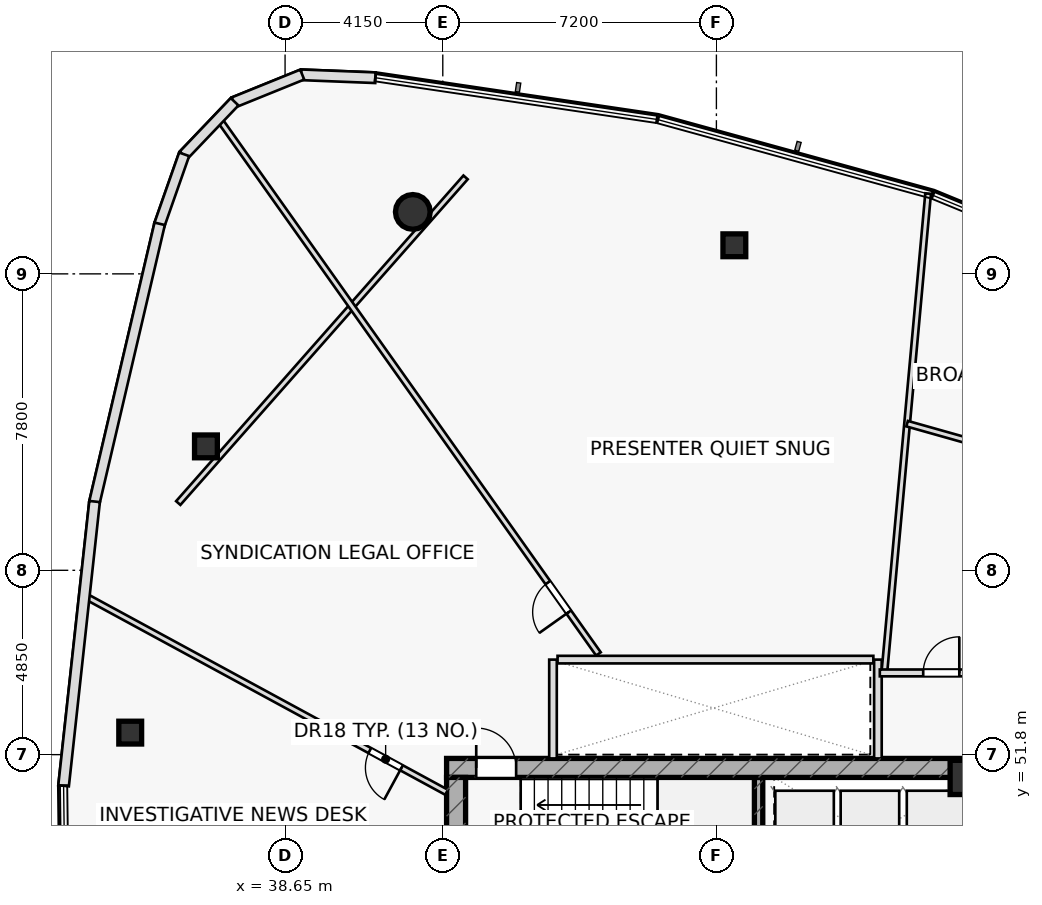
"""IFC4 building model, lengths in metres.
Left out: names, types, materials, properties, quantities, classifications, styles, units other than length and angle.
Written with IfcOpenShell. Run it as: python <this file> out.ifc"""

import sys

from ifc_helpers import new_model, si_unit, direction, frame, frame_2d, origin, origin_2d, place, context, subcontext, project, spatial, rectangle, hollow_rectangle, hollow_circle, extrude, element, fill, save


model = new_model("IFC4")
c1 = context("Model", 3, precision=1e-05, world=origin(), true_north=direction((0.0, 1.0)))
c2 = subcontext(c1, "Body", "Model", "MODEL_VIEW")
j1 = project(units=[si_unit("LENGTHUNIT", "METRE"), si_unit("PLANEANGLEUNIT", "RADIAN")], contexts=[c1])
p1 = place(None, origin())
s1 = spatial("IfcSite", under=j1, at=p1, CompositionType="ELEMENT")
p2 = place(p1, origin())
s2 = spatial("IfcBuilding", under=s1, at=p2, CompositionType="ELEMENT")
p3 = place(p2, frame((0.0, 0.0, 177.2)))
s3 = spatial("IfcBuildingStorey", under=s2, at=p3, CompositionType="ELEMENT", Elevation=177.2)
p4 = place(p3, frame((51.11, 48.1, 0.0), z_axis=(0.0, 0.0, 1.0), x_axis=(0.0, 1.0, 0.0)))
e1 = element("IfcWall", 1, at=p4, inside=s3, PredefinedType="SHEAR", context=c2, shape_type="SweptSolid", body=[
    extrude(rectangle(XDim=3.1, YDim=0.22, at=frame_2d((1.55, 0.0))), origin(), (0.0, 0.0, 1.0), 3.55),
])
p5 = place(p3, frame((42.9, 51.45, 0.0), z_axis=(0.0, 0.0, 1.0), x_axis=(1.0, 0.0, 0.0)))
e2 = element("IfcWall", 2, at=p5, inside=s3, PredefinedType="SHEAR", context=c2, shape_type="SweptSolid", body=[
    extrude(rectangle(XDim=14.2, YDim=0.5, at=frame_2d((7.1, 0.0))), origin(), (0.0, 0.0, 1.0), 3.55),
])
p6 = place(p5, frame((0.78, 0.0, 0.0)))
e3 = element("IfcOpeningElement", 3, at=p6, cuts=e2, PredefinedType="OPENING", context=c2, shape_type="SweptSolid", body=[
    extrude(rectangle(XDim=1.05, YDim=2.2, at=frame_2d((0.525, 1.1))), frame((0.0, 0.26, 0.0), z_axis=(0.0, -1.0, 0.0), x_axis=(1.0, 0.0, 0.0)), (0.0, 0.0, 1.0), 0.52),
])
p7 = place(p3, frame((43.15, 38.8, 0.0), z_axis=(0.0, 0.0, 1.0), x_axis=(0.0, 1.0, 0.0)))
e4 = element("IfcWall", 4, at=p7, inside=s3, PredefinedType="SHEAR", context=c2, shape_type="SweptSolid", body=[
    extrude(rectangle(XDim=12.4, YDim=0.5, at=frame_2d((6.2, 0.0))), origin(), (0.0, 0.0, 1.0), 3.55),
])
p8 = place(p3, frame((56.6, 51.2, 0.0), z_axis=(0.0, 0.0, 1.0), x_axis=(1.0, 0.0, 0.0)))
e5 = element("IfcColumn", 5, at=p8, inside=s3, PredefinedType="COLUMN", context=c2, shape_type="SweptSolid", body=[
    extrude(rectangle(XDim=0.9, YDim=0.9, at=origin_2d()), origin(), (0.0, 0.0, 1.0), 3.55),
])
p9 = place(p3, frame((42.011, 66.08, 0.0), z_axis=(0.0, 0.0, 1.0), x_axis=(1.0, 0.0, 0.0)))
e6 = element("IfcColumn", 6, at=p9, inside=s3, PredefinedType="COLUMN", context=c2, shape_type="SweptSolid", body=[
    extrude(hollow_circle(Radius=0.457, WallThickness=0.04, at=origin_2d()), origin(), (0.0, 0.0, 1.0), 3.55),
])
for number, where, z_axis, x_axis in (
    (7, (36.568, 59.911, 0.0), (0.0, 0.0, 1.0), (1.0, 0.0, 0.0)),
    (8, (34.575, 52.379, 0.0), (0.0, 0.0, 1.0), (1.0, 0.0, 0.0)),
    (9, (50.472, 65.202, 0.0), (0.0, 0.0, 1.0), (1.0, 0.0, 0.0)),
):
    element("IfcColumn", number, at=place(p3, frame(where, z_axis=z_axis, x_axis=x_axis)), inside=s3, PredefinedType="COLUMN", context=c2, shape_type="SweptSolid", body=[
        extrude(hollow_rectangle(XDim=0.6, YDim=0.6, WallThickness=0.036, at=origin_2d()), origin(), (0.0, 0.0, 1.0), 3.55),
    ])
for number, where, z_axis, x_axis in (
    (10, (45.7, 51.7, 0.0), (0.0, 0.0, 1.0), (0.0, 1.0, 0.0)),
    (11, (54.25, 51.7, 0.0), (0.0, 0.0, 1.0), (0.0, 1.0, 0.0)),
):
    element("IfcWall", number, at=place(p3, frame(where, z_axis=z_axis, x_axis=x_axis)), inside=s3, PredefinedType="PARTITIONING", context=c2, shape_type="SweptSolid", body=[
        extrude(rectangle(XDim=2.6, YDim=0.2, at=frame_2d((1.3, 0.0))), origin(), (0.0, 0.0, 1.0), 3.55),
    ])
p10 = place(p3, frame((43.4, 66.989, 0.0), z_axis=(0.0, 0.0, 1.0), x_axis=(-0.661622343701, -0.749837231881, 0.0)))
e12 = element("IfcWall", 12, at=p10, inside=s3, PredefinedType="PARTITIONING", context=c2, shape_type="SweptSolid", body=[
    extrude(rectangle(XDim=11.427, YDim=0.15, at=frame_2d((5.714, 0.0))), origin(), (0.0, 0.0, 1.0), 2.935),
])
p11 = place(p3, frame((42.9, 50.81, 0.0), z_axis=(0.0, 0.0, 1.0), x_axis=(-0.878810866854, 0.477170263427, 0.0)))
e13 = element("IfcWall", 13, at=p11, inside=s3, PredefinedType="PARTITIONING", context=c2, shape_type="SweptSolid", body=[
    extrude(rectangle(XDim=10.858, YDim=0.15, at=frame_2d((5.429, 0.0))), origin(), (0.0, 0.0, 1.0), 2.935),
])
p12 = place(p11, frame((1.35, 0.0, 0.0)))
e14 = element("IfcOpeningElement", 14, at=p12, cuts=e13, PredefinedType="OPENING", context=c2, shape_type="SweptSolid", body=[
    extrude(rectangle(XDim=0.95, YDim=2.05, at=frame_2d((0.475, 1.025))), frame((0.0, 0.085, 0.0), z_axis=(0.0, -1.0, 0.0), x_axis=(1.0, 0.0, 0.0)), (0.0, 0.0, 1.0), 0.17),
])
p13 = place(p3, frame((54.418, 53.95, 0.0), z_axis=(0.0, 0.0, 1.0), x_axis=(0.091038002484, 0.995847419088, 0.0)))
e15 = element("IfcWall", 15, at=p13, inside=s3, PredefinedType="PARTITIONING", context=c2, shape_type="SweptSolid", body=[
    extrude(rectangle(XDim=12.666, YDim=0.15, at=frame_2d((6.333, 0.0))), origin(), (0.0, 0.0, 1.0), 2.935),
])
p14 = place(p3, frame((46.896, 54.45, 0.0), z_axis=(0.0, 0.0, 1.0), x_axis=(-0.578628204747, 0.81559144225, 0.0)))
e16 = element("IfcWall", 16, at=p14, inside=s3, PredefinedType="PARTITIONING", context=c2, shape_type="SweptSolid", body=[
    extrude(rectangle(XDim=17.283, YDim=0.15, at=frame_2d((8.642, 0.0))), origin(), (0.0, 0.0, 1.0), 2.935),
])
p15 = place(p14, frame((1.35, 0.0, 0.0)))
e17 = element("IfcOpeningElement", 17, at=p15, cuts=e16, PredefinedType="OPENING", context=c2, shape_type="SweptSolid", body=[
    extrude(rectangle(XDim=0.95, YDim=2.05, at=frame_2d((0.475, 1.025))), frame((0.0, 0.085, 0.0), z_axis=(0.0, -1.0, 0.0), x_axis=(1.0, 0.0, 0.0)), (0.0, 0.0, 1.0), 0.17),
])
p16 = place(p3, frame((59.436, 59.263, 0.0), z_axis=(0.0, 0.0, 1.0), x_axis=(-0.962485295009, 0.27133384767, 0.0)))
e18 = element("IfcWall", 18, at=p16, inside=s3, PredefinedType="PARTITIONING", context=c2, shape_type="SweptSolid", body=[
    extrude(rectangle(XDim=4.591, YDim=0.15, at=frame_2d((2.295, 0.0))), origin(), (0.0, 0.0, 1.0), 2.935),
])
p17 = place(p16, frame((1.82, 0.0, 0.0)))
e19 = element("IfcOpeningElement", 19, at=p17, cuts=e18, PredefinedType="OPENING", context=c2, shape_type="SweptSolid", body=[
    extrude(rectangle(XDim=0.95, YDim=2.05, at=frame_2d((0.475, 1.025))), frame((0.0, 0.085, 0.0), z_axis=(0.0, -1.0, 0.0), x_axis=(1.0, 0.0, 0.0)), (0.0, 0.0, 1.0), 0.17),
])
p18 = place(p3, frame((54.3, 53.95, 0.0), z_axis=(0.0, 0.0, 1.0), x_axis=(1.0, 0.0, 0.0)))
e20 = element("IfcWall", 20, at=p18, inside=s3, PredefinedType="PARTITIONING", context=c2, shape_type="SweptSolid", body=[
    extrude(rectangle(XDim=5.1, YDim=0.18, at=frame_2d((2.55, 0.0))), origin(), (0.0, 0.0, 1.0), 2.935),
])
p19 = place(p18, frame((1.142, 0.0, 0.0)))
e21 = element("IfcOpeningElement", 21, at=p19, cuts=e20, PredefinedType="OPENING", context=c2, shape_type="SweptSolid", body=[
    extrude(rectangle(XDim=0.95, YDim=2.05, at=frame_2d((0.475, 1.025))), frame((0.0, 0.1, 0.0), z_axis=(0.0, -1.0, 0.0), x_axis=(1.0, 0.0, 0.0)), (0.0, 0.0, 1.0), 0.2),
])
p20 = place(p3, frame((41.028, 69.611, 0.0), z_axis=(0.0, 0.0, 1.0), x_axis=(-0.999227827383, 0.039290571168, 0.0)))
e22 = element("IfcWall", 22, at=p20, inside=s3, PredefinedType="STANDARD", context=c2, shape_type="SweptSolid", body=[
    extrude(rectangle(XDim=1.957, YDim=0.28, at=frame_2d((0.979, 0.0))), origin(), (0.0, 0.0, 1.0), 3.55),
])
p21 = place(p3, frame((39.101, 69.693, 0.0), z_axis=(0.0, 0.0, 1.0), x_axis=(-0.926840788413, -0.375454595036, 0.0)))
e23 = element("IfcWall", 23, at=p21, inside=s3, PredefinedType="STANDARD", context=c2, shape_type="SweptSolid", body=[
    extrude(rectangle(XDim=1.946, YDim=0.28, at=frame_2d((0.973, 0.0))), origin(), (0.0, 0.0, 1.0), 3.55),
])
p22 = place(p3, frame((37.322, 68.979, 0.0), z_axis=(0.0, 0.0, 1.0), x_axis=(-0.69022204711, -0.723597626919, 0.0)))
e24 = element("IfcWall", 24, at=p22, inside=s3, PredefinedType="STANDARD", context=c2, shape_type="SweptSolid", body=[
    extrude(rectangle(XDim=1.946, YDim=0.28, at=frame_2d((0.973, 0.0))), origin(), (0.0, 0.0, 1.0), 3.55),
])
p23 = place(p3, frame((35.994, 67.596, 0.0), z_axis=(0.0, 0.0, 1.0), x_axis=(-0.33129501768, -0.943527218081, 0.0)))
e25 = element("IfcWall", 25, at=p23, inside=s3, PredefinedType="STANDARD", context=c2, shape_type="SweptSolid", body=[
    extrude(rectangle(XDim=1.968, YDim=0.28, at=frame_2d((0.984, 0.0))), origin(), (0.0, 0.0, 1.0), 3.55),
])
p24 = place(p3, frame((35.35, 65.768, 0.0), z_axis=(0.0, 0.0, 1.0), x_axis=(-0.227932176766, -0.973677011537, 0.0)))
e26 = element("IfcWall", 26, at=p24, inside=s3, PredefinedType="STANDARD", context=c2, shape_type="SweptSolid", body=[
    extrude(rectangle(XDim=7.535, YDim=0.28, at=frame_2d((3.768, 0.0))), origin(), (0.0, 0.0, 1.0), 3.55),
])
p25 = place(p3, frame((33.638, 58.46, 0.0), z_axis=(0.0, 0.0, 1.0), x_axis=(-0.108447510175, -0.994102176608, 0.0)))
e27 = element("IfcWall", 27, at=p25, inside=s3, PredefinedType="STANDARD", context=c2, shape_type="SweptSolid", body=[
    extrude(rectangle(XDim=7.524, YDim=0.28, at=frame_2d((3.762, 0.0))), origin(), (0.0, 0.0, 1.0), 3.55),
])
p26 = place(p3, frame((45.82, 54.3, 0.0), z_axis=(0.0, 0.0, 1.0), x_axis=(1.0, 0.0, 0.0)))
e28 = element("IfcWall", 28, at=p26, inside=s3, PredefinedType="PARTITIONING", context=c2, shape_type="SweptSolid", body=[
    extrude(rectangle(XDim=8.31, YDim=0.2, at=frame_2d((4.155, 0.0))), origin(), (0.0, 0.0, 1.0), 3.55),
])
p27 = place(p6, origin())
e29 = element("IfcDoor", 29, at=p27, inside=s3, OperationType="SINGLE_SWING_LEFT", PredefinedType="DOOR", context=c2, shape_type="SweptSolid", body=[
    extrude(rectangle(XDim=1.05, YDim=2.2, at=frame_2d((0.525, 1.1))), frame((0.0, 0.025, 0.0), z_axis=(0.0, -1.0, 0.0), x_axis=(1.0, 0.0, 0.0)), (0.0, 0.0, 1.0), 0.05),
])
fill(e3, e29)
p28 = place(p12, origin())
e30 = element("IfcDoor", 30, at=p28, inside=s3, OperationType="SINGLE_SWING_LEFT", PredefinedType="DOOR", context=c2, shape_type="SweptSolid", body=[
    extrude(rectangle(XDim=0.95, YDim=2.05, at=frame_2d((0.475, 1.025))), frame((0.0, 0.025, 0.0), z_axis=(0.0, -1.0, 0.0), x_axis=(1.0, 0.0, 0.0)), (0.0, 0.0, 1.0), 0.05),
])
fill(e14, e30)
p29 = place(p15, origin())
e31 = element("IfcDoor", 31, at=p29, inside=s3, OperationType="SINGLE_SWING_LEFT", PredefinedType="DOOR", context=c2, shape_type="SweptSolid", body=[
    extrude(rectangle(XDim=0.95, YDim=2.05, at=frame_2d((0.475, 1.025))), frame((0.0, 0.025, 0.0), z_axis=(0.0, -1.0, 0.0), x_axis=(1.0, 0.0, 0.0)), (0.0, 0.0, 1.0), 0.05),
])
fill(e17, e31)
p30 = place(p19, origin())
e32 = element("IfcDoor", 32, at=p30, inside=s3, OperationType="SINGLE_SWING_RIGHT", PredefinedType="DOOR", context=c2, shape_type="SweptSolid", body=[
    extrude(rectangle(XDim=0.95, YDim=2.05, at=frame_2d((0.475, 1.025))), frame((0.0, 0.025, 0.0), z_axis=(0.0, -1.0, 0.0), x_axis=(1.0, 0.0, 0.0)), (0.0, 0.0, 1.0), 0.05),
])
fill(e21, e32)
save(model, sys.argv[1])
